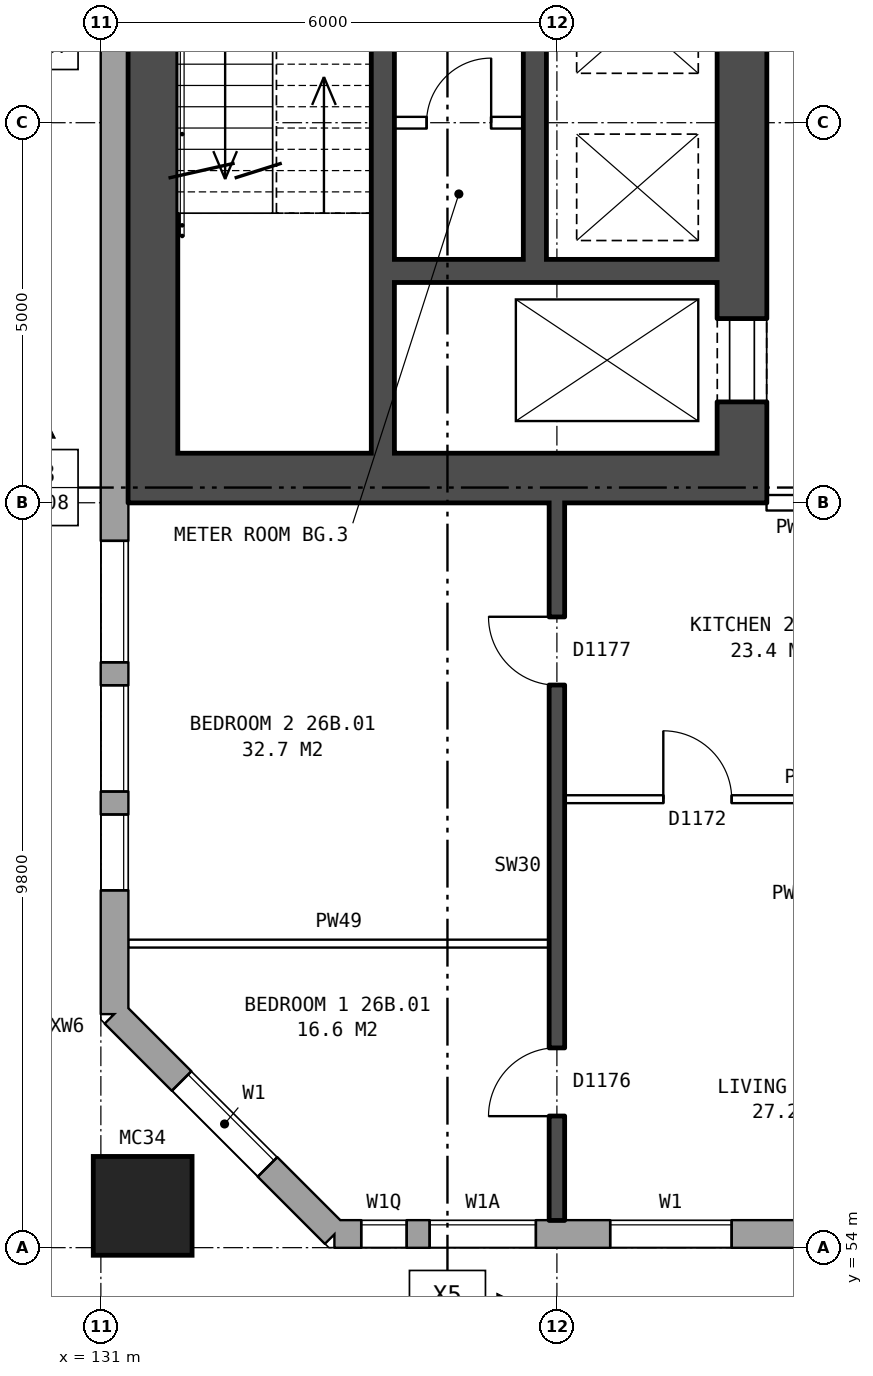
"""IFC4 building model, lengths in metres.
Left out: names, types, materials, properties, quantities, classifications, styles, units other than length and angle.
Written with IfcOpenShell. Run it as: python <this file> out.ifc"""

import sys

from ifc_helpers import new_model, si_unit, direction, frame, frame_2d, origin, origin_2d, place, context, subcontext, project, spatial, rectangle, hollow_rectangle, extrude, element, fill, save


model = new_model("IFC4")
c1 = context("Model", 3, precision=1e-05, world=origin(), true_north=direction((0.0, 1.0)))
c2 = subcontext(c1, "Body", "Model", "MODEL_VIEW")
j1 = project(units=[si_unit("LENGTHUNIT", "METRE"), si_unit("PLANEANGLEUNIT", "RADIAN")], contexts=[c1])
p1 = place(None, origin())
s1 = spatial("IfcSite", under=j1, at=p1, CompositionType="ELEMENT")
p2 = place(p1, origin())
s2 = spatial("IfcBuilding", under=s1, at=p2, CompositionType="ELEMENT")
p3 = place(p2, frame((0.0, 0.0, 96.4)))
s3 = spatial("IfcBuildingStorey", under=s2, at=p3, CompositionType="ELEMENT", Elevation=96.4)
p4 = place(p3, frame((131.55, 54.55, 0.0), z_axis=(0.0, 0.0, 1.0), x_axis=(1.0, 0.0, 0.0)))
e1 = element("IfcColumn", 1, at=p4, inside=s3, PredefinedType="COLUMN", context=c2, shape_type="SweptSolid", body=[
    extrude(hollow_rectangle(XDim=1.3, YDim=1.3, WallThickness=0.07, at=origin_2d()), origin(), (0.0, 0.0, 1.0), 3.1),
])
p5 = place(p3, frame((131.18, 57.075, 0.0), z_axis=(0.0, 0.0, 1.0), x_axis=(0.707106781187, -0.707106781187, 0.0)))
e2 = element("IfcWall", 2, at=p5, inside=s3, PredefinedType="STANDARD", context=c2, shape_type="SweptSolid", body=[
    extrude(rectangle(XDim=4.094, YDim=0.36, at=frame_2d((2.047, 0.0))), origin(), (0.0, 0.0, 1.0), 2.85),
])
p6 = place(p5, frame((1.247, 0.0, 0.8)))
e3 = element("IfcOpeningElement", 3, at=p6, cuts=e2, PredefinedType="OPENING", context=c2, shape_type="SweptSolid", body=[
    extrude(rectangle(XDim=1.6, YDim=1.8, at=frame_2d((0.8, 0.9))), frame((0.0, 0.19, 0.0), z_axis=(0.0, -1.0, 0.0), x_axis=(1.0, 0.0, 0.0)), (0.0, 0.0, 1.0), 0.38),
])
p7 = place(p3, frame((134.075, 54.18, 0.0), z_axis=(0.0, 0.0, 1.0), x_axis=(1.0, 0.0, 0.0)))
e4 = element("IfcWall", 4, at=p7, inside=s3, PredefinedType="STANDARD", context=c2, shape_type="SweptSolid", body=[
    extrude(rectangle(XDim=36.851, YDim=0.36, at=frame_2d((18.425, 0.0))), origin(), (0.0, 0.0, 1.0), 2.85),
])
p8 = place(p7, frame((0.35, 0.0, 0.8)))
e5 = element("IfcOpeningElement", 5, at=p8, cuts=e4, PredefinedType="OPENING", context=c2, shape_type="SweptSolid", body=[
    extrude(rectangle(XDim=0.6, YDim=1.2, at=frame_2d((0.3, 0.6))), frame((0.0, 0.19, 0.0), z_axis=(0.0, -1.0, 0.0), x_axis=(1.0, 0.0, 0.0)), (0.0, 0.0, 1.0), 0.38),
])
p9 = place(p7, frame((3.625, 0.0, 0.8)))
e6 = element("IfcOpeningElement", 6, at=p9, cuts=e4, PredefinedType="OPENING", context=c2, shape_type="SweptSolid", body=[
    extrude(rectangle(XDim=1.6, YDim=1.8, at=frame_2d((0.8, 0.9))), frame((0.0, 0.19, 0.0), z_axis=(0.0, -1.0, 0.0), x_axis=(1.0, 0.0, 0.0)), (0.0, 0.0, 1.0), 0.38),
])
p10 = place(p7, frame((6.625, 0.0, 0.8)))
e7 = element("IfcOpeningElement", 7, at=p10, cuts=e4, PredefinedType="OPENING", context=c2, shape_type="SweptSolid", body=[
    extrude(rectangle(XDim=1.6, YDim=1.8, at=frame_2d((0.8, 0.9))), frame((0.0, 0.19, 0.0), z_axis=(0.0, -1.0, 0.0), x_axis=(1.0, 0.0, 0.0)), (0.0, 0.0, 1.0), 0.38),
])
p11 = place(p7, frame((9.625, 0.0, 0.8)))
e8 = element("IfcOpeningElement", 8, at=p11, cuts=e4, PredefinedType="OPENING", context=c2, shape_type="SweptSolid", body=[
    extrude(rectangle(XDim=1.6, YDim=1.8, at=frame_2d((0.8, 0.9))), frame((0.0, 0.19, 0.0), z_axis=(0.0, -1.0, 0.0), x_axis=(1.0, 0.0, 0.0)), (0.0, 0.0, 1.0), 0.38),
])
p12 = place(p7, frame((12.625, 0.0, 0.8)))
e9 = element("IfcOpeningElement", 9, at=p12, cuts=e4, PredefinedType="OPENING", context=c2, shape_type="SweptSolid", body=[
    extrude(rectangle(XDim=1.6, YDim=1.8, at=frame_2d((0.8, 0.9))), frame((0.0, 0.19, 0.0), z_axis=(0.0, -1.0, 0.0), x_axis=(1.0, 0.0, 0.0)), (0.0, 0.0, 1.0), 0.38),
])
p13 = place(p7, frame((15.625, 0.0, 0.8)))
e10 = element("IfcOpeningElement", 10, at=p13, cuts=e4, PredefinedType="OPENING", context=c2, shape_type="SweptSolid", body=[
    extrude(rectangle(XDim=1.6, YDim=1.8, at=frame_2d((0.8, 0.9))), frame((0.0, 0.19, 0.0), z_axis=(0.0, -1.0, 0.0), x_axis=(1.0, 0.0, 0.0)), (0.0, 0.0, 1.0), 0.38),
])
p14 = place(p7, frame((18.625, 0.0, 0.8)))
e11 = element("IfcOpeningElement", 11, at=p14, cuts=e4, PredefinedType="OPENING", context=c2, shape_type="SweptSolid", body=[
    extrude(rectangle(XDim=1.6, YDim=1.8, at=frame_2d((0.8, 0.9))), frame((0.0, 0.19, 0.0), z_axis=(0.0, -1.0, 0.0), x_axis=(1.0, 0.0, 0.0)), (0.0, 0.0, 1.0), 0.38),
])
p15 = place(p7, frame((21.625, 0.0, 0.8)))
e12 = element("IfcOpeningElement", 12, at=p15, cuts=e4, PredefinedType="OPENING", context=c2, shape_type="SweptSolid", body=[
    extrude(rectangle(XDim=1.6, YDim=1.8, at=frame_2d((0.8, 0.9))), frame((0.0, 0.19, 0.0), z_axis=(0.0, -1.0, 0.0), x_axis=(1.0, 0.0, 0.0)), (0.0, 0.0, 1.0), 0.38),
])
p16 = place(p7, frame((24.625, 0.0, 0.8)))
e13 = element("IfcOpeningElement", 13, at=p16, cuts=e4, PredefinedType="OPENING", context=c2, shape_type="SweptSolid", body=[
    extrude(rectangle(XDim=1.6, YDim=1.8, at=frame_2d((0.8, 0.9))), frame((0.0, 0.19, 0.0), z_axis=(0.0, -1.0, 0.0), x_axis=(1.0, 0.0, 0.0)), (0.0, 0.0, 1.0), 0.38),
])
p17 = place(p7, frame((27.625, 0.0, 0.8)))
e14 = element("IfcOpeningElement", 14, at=p17, cuts=e4, PredefinedType="OPENING", context=c2, shape_type="SweptSolid", body=[
    extrude(rectangle(XDim=1.6, YDim=1.8, at=frame_2d((0.8, 0.9))), frame((0.0, 0.19, 0.0), z_axis=(0.0, -1.0, 0.0), x_axis=(1.0, 0.0, 0.0)), (0.0, 0.0, 1.0), 0.38),
])
p18 = place(p7, frame((30.625, 0.0, 0.8)))
e15 = element("IfcOpeningElement", 15, at=p18, cuts=e4, PredefinedType="OPENING", context=c2, shape_type="SweptSolid", body=[
    extrude(rectangle(XDim=1.6, YDim=1.8, at=frame_2d((0.8, 0.9))), frame((0.0, 0.19, 0.0), z_axis=(0.0, -1.0, 0.0), x_axis=(1.0, 0.0, 0.0)), (0.0, 0.0, 1.0), 0.38),
])
p19 = place(p7, frame((33.625, 0.0, 0.8)))
e16 = element("IfcOpeningElement", 16, at=p19, cuts=e4, PredefinedType="OPENING", context=c2, shape_type="SweptSolid", body=[
    extrude(rectangle(XDim=1.6, YDim=1.8, at=frame_2d((0.8, 0.9))), frame((0.0, 0.19, 0.0), z_axis=(0.0, -1.0, 0.0), x_axis=(1.0, 0.0, 0.0)), (0.0, 0.0, 1.0), 0.38),
])
p20 = place(p7, frame((1.25, 0.0, 0.8)))
e17 = element("IfcOpeningElement", 17, at=p20, cuts=e4, PredefinedType="OPENING", context=c2, shape_type="SweptSolid", body=[
    extrude(rectangle(XDim=1.4, YDim=1.8, at=frame_2d((0.7, 0.9))), frame((0.0, 0.19, 0.0), z_axis=(0.0, -1.0, 0.0), x_axis=(1.0, 0.0, 0.0)), (0.0, 0.0, 1.0), 0.38),
])
p21 = place(p3, frame((131.18, 82.925, 0.0), z_axis=(0.0, 0.0, 1.0), x_axis=(0.0, -1.0, 0.0)))
e18 = element("IfcWall", 18, at=p21, inside=s3, PredefinedType="STANDARD", context=c2, shape_type="SweptSolid", body=[
    extrude(rectangle(XDim=25.851, YDim=0.36, at=frame_2d((12.925, 0.0))), origin(), (0.0, 0.0, 1.0), 2.85),
])
p22 = place(p21, frame((1.425, 0.0, 0.8)))
e19 = element("IfcOpeningElement", 19, at=p22, cuts=e18, PredefinedType="OPENING", context=c2, shape_type="SweptSolid", body=[
    extrude(rectangle(XDim=1.0, YDim=1.2, at=frame_2d((0.5, 0.6))), frame((0.0, 0.19, 0.0), z_axis=(0.0, -1.0, 0.0), x_axis=(1.0, 0.0, 0.0)), (0.0, 0.0, 1.0), 0.38),
])
p23 = place(p21, frame((4.625, 0.0, 0.8)))
e20 = element("IfcOpeningElement", 20, at=p23, cuts=e18, PredefinedType="OPENING", context=c2, shape_type="SweptSolid", body=[
    extrude(rectangle(XDim=1.6, YDim=1.8, at=frame_2d((0.8, 0.9))), frame((0.0, 0.19, 0.0), z_axis=(0.0, -1.0, 0.0), x_axis=(1.0, 0.0, 0.0)), (0.0, 0.0, 1.0), 0.38),
])
p24 = place(p21, frame((19.625, 0.0, 0.8)))
e21 = element("IfcOpeningElement", 21, at=p24, cuts=e18, PredefinedType="OPENING", context=c2, shape_type="SweptSolid", body=[
    extrude(rectangle(XDim=1.6, YDim=1.8, at=frame_2d((0.8, 0.9))), frame((0.0, 0.19, 0.0), z_axis=(0.0, -1.0, 0.0), x_axis=(1.0, 0.0, 0.0)), (0.0, 0.0, 1.0), 0.38),
])
p25 = place(p21, frame((21.525, 0.0, 0.8)))
e22 = element("IfcOpeningElement", 22, at=p25, cuts=e18, PredefinedType="OPENING", context=c2, shape_type="SweptSolid", body=[
    extrude(rectangle(XDim=1.4, YDim=1.8, at=frame_2d((0.7, 0.9))), frame((0.0, 0.19, 0.0), z_axis=(0.0, -1.0, 0.0), x_axis=(1.0, 0.0, 0.0)), (0.0, 0.0, 1.0), 0.38),
])
p26 = place(p21, frame((2.725, 0.0, 0.8)))
e23 = element("IfcOpeningElement", 23, at=p26, cuts=e18, PredefinedType="OPENING", context=c2, shape_type="SweptSolid", body=[
    extrude(rectangle(XDim=1.4, YDim=1.8, at=frame_2d((0.7, 0.9))), frame((0.0, 0.19, 0.0), z_axis=(0.0, -1.0, 0.0), x_axis=(1.0, 0.0, 0.0)), (0.0, 0.0, 1.0), 0.38),
])
p27 = place(p21, frame((23.225, 0.0, 0.8)))
e24 = element("IfcOpeningElement", 24, at=p27, cuts=e18, PredefinedType="OPENING", context=c2, shape_type="SweptSolid", body=[
    extrude(rectangle(XDim=1.0, YDim=1.2, at=frame_2d((0.5, 0.6))), frame((0.0, 0.19, 0.0), z_axis=(0.0, -1.0, 0.0), x_axis=(1.0, 0.0, 0.0)), (0.0, 0.0, 1.0), 0.38),
])
p28 = place(p3, frame((139.435, 64.45, 0.0), z_axis=(0.0, 0.0, 1.0), x_axis=(0.0, 1.0, 0.0)))
e25 = element("IfcWall", 25, at=p28, inside=s3, PredefinedType="SHEAR", context=c2, shape_type="SweptSolid", body=[
    extrude(rectangle(XDim=11.1, YDim=0.65, at=frame_2d((5.55, 0.0))), origin(), (0.0, 0.0, 1.0), 2.85),
])
p29 = place(p28, frame((0.675, 0.0, 0.0)))
e26 = element("IfcOpeningElement", 26, at=p29, cuts=e25, PredefinedType="OPENING", context=c2, shape_type="SweptSolid", body=[
    extrude(rectangle(XDim=1.1, YDim=2.1, at=frame_2d((0.55, 1.05))), frame((0.0, 0.335, 0.0), z_axis=(0.0, -1.0, 0.0), x_axis=(1.0, 0.0, 0.0)), (0.0, 0.0, 1.0), 0.67),
])
p30 = place(p28, frame((9.25, 0.0, 0.0)))
e27 = element("IfcOpeningElement", 27, at=p30, cuts=e25, PredefinedType="OPENING", context=c2, shape_type="SweptSolid", body=[
    extrude(rectangle(XDim=1.1, YDim=2.1, at=frame_2d((0.55, 1.05))), frame((0.0, 0.335, 0.0), z_axis=(0.0, -1.0, 0.0), x_axis=(1.0, 0.0, 0.0)), (0.0, 0.0, 1.0), 0.67),
])
p31 = place(p28, frame((7.475, 0.0, 0.0)))
e28 = element("IfcOpeningElement", 28, at=p31, cuts=e25, PredefinedType="OPENING", context=c2, shape_type="SweptSolid", body=[
    extrude(rectangle(XDim=0.85, YDim=2.1, at=frame_2d((0.425, 1.05))), frame((0.0, 0.335, 0.0), z_axis=(0.0, -1.0, 0.0), x_axis=(1.0, 0.0, 0.0)), (0.0, 0.0, 1.0), 0.67),
])
p32 = place(p3, frame((131.685, 64.45, 0.0), z_axis=(0.0, 0.0, 1.0), x_axis=(0.0, 1.0, 0.0)))
e29 = element("IfcWall", 29, at=p32, inside=s3, PredefinedType="SHEAR", context=c2, shape_type="SweptSolid", body=[
    extrude(rectangle(XDim=11.1, YDim=0.65, at=frame_2d((5.55, 0.0))), origin(), (0.0, 0.0, 1.0), 2.85),
])
p33 = place(p3, frame((139.76, 64.125, 0.0), z_axis=(0.0, 0.0, 1.0), x_axis=(-1.0, 0.0, 0.0)))
e30 = element("IfcWall", 30, at=p33, inside=s3, PredefinedType="SHEAR", context=c2, shape_type="SweptSolid", body=[
    extrude(rectangle(XDim=8.4, YDim=0.65, at=frame_2d((4.2, 0.0))), origin(), (0.0, 0.0, 1.0), 2.85),
])
p34 = place(p3, frame((139.11, 66.85, 0.0), z_axis=(0.0, 0.0, 1.0), x_axis=(-1.0, 0.0, 0.0)))
e31 = element("IfcWall", 31, at=p34, inside=s3, PredefinedType="SHEAR", context=c2, shape_type="SweptSolid", body=[
    extrude(rectangle(XDim=4.25, YDim=0.3, at=frame_2d((2.125, 0.0))), origin(), (0.0, 0.0, 1.0), 2.85),
])
p35 = place(p3, frame((136.56, 68.8, 0.0), z_axis=(0.0, 0.0, 1.0), x_axis=(-1.0, 0.0, 0.0)))
e32 = element("IfcWall", 32, at=p35, inside=s3, PredefinedType="PARTITIONING", context=c2, shape_type="SweptSolid", body=[
    extrude(rectangle(XDim=1.7, YDim=0.15, at=frame_2d((0.85, 0.0))), origin(), (0.0, 0.0, 1.0), 2.85),
])
p36 = place(p35, frame((0.425, 0.0, 0.0)))
e33 = element("IfcOpeningElement", 33, at=p36, cuts=e32, PredefinedType="OPENING", context=c2, shape_type="SweptSolid", body=[
    extrude(rectangle(XDim=0.85, YDim=2.1, at=frame_2d((0.425, 1.05))), frame((0.0, 0.085, 0.0), z_axis=(0.0, -1.0, 0.0), x_axis=(1.0, 0.0, 0.0)), (0.0, 0.0, 1.0), 0.17),
])
p37 = place(p3, frame((136.71, 67.0, 0.0), z_axis=(0.0, 0.0, 1.0), x_axis=(0.0, 1.0, 0.0)))
e34 = element("IfcWall", 34, at=p37, inside=s3, PredefinedType="SHEAR", context=c2, shape_type="SweptSolid", body=[
    extrude(rectangle(XDim=4.1, YDim=0.3, at=frame_2d((2.05, 0.0))), origin(), (0.0, 0.0, 1.0), 2.85),
])
p38 = place(p3, frame((134.71, 64.45, 0.0), z_axis=(0.0, 0.0, 1.0), x_axis=(0.0, 1.0, 0.0)))
e35 = element("IfcWall", 35, at=p38, inside=s3, PredefinedType="SHEAR", context=c2, shape_type="SweptSolid", body=[
    extrude(rectangle(XDim=6.65, YDim=0.3, at=frame_2d((3.325, 0.0))), origin(), (0.0, 0.0, 1.0), 2.85),
])
p39 = place(p3, frame((131.36, 58.0, 0.0), z_axis=(0.0, 0.0, 1.0), x_axis=(1.0, 0.0, 0.0)))
e36 = element("IfcWall", 36, at=p39, inside=s3, PredefinedType="PARTITIONING", context=c2, shape_type="SweptSolid", body=[
    extrude(rectangle(XDim=5.54, YDim=0.1, at=frame_2d((2.77, 0.0))), origin(), (0.0, 0.0, 1.0), 2.85),
])
p40 = place(p3, frame((137.1, 59.9, 0.0), z_axis=(0.0, 0.0, 1.0), x_axis=(1.0, 0.0, 0.0)))
e37 = element("IfcWall", 37, at=p40, inside=s3, PredefinedType="PARTITIONING", context=c2, shape_type="SweptSolid", body=[
    extrude(rectangle(XDim=5.8, YDim=0.1, at=frame_2d((2.9, 0.0))), origin(), (0.0, 0.0, 1.0), 2.85),
])
p41 = place(p40, frame((1.3, 0.0, 0.0)))
e38 = element("IfcOpeningElement", 38, at=p41, cuts=e37, PredefinedType="OPENING", context=c2, shape_type="SweptSolid", body=[
    extrude(rectangle(XDim=0.9, YDim=2.1, at=frame_2d((0.45, 1.05))), frame((0.0, 0.06, 0.0), z_axis=(0.0, -1.0, 0.0), x_axis=(1.0, 0.0, 0.0)), (0.0, 0.0, 1.0), 0.12),
])
p42 = place(p40, frame((4.2, 0.0, 0.0)))
e39 = element("IfcOpeningElement", 39, at=p42, cuts=e37, PredefinedType="OPENING", context=c2, shape_type="SweptSolid", body=[
    extrude(rectangle(XDim=0.9, YDim=2.1, at=frame_2d((0.45, 1.05))), frame((0.0, 0.06, 0.0), z_axis=(0.0, -1.0, 0.0), x_axis=(1.0, 0.0, 0.0)), (0.0, 0.0, 1.0), 0.12),
])
p43 = place(p3, frame((139.76, 63.8, 0.0), z_axis=(0.0, 0.0, 1.0), x_axis=(1.0, 0.0, 0.0)))
e40 = element("IfcWall", 40, at=p43, inside=s3, PredefinedType="PARTITIONING", context=c2, shape_type="SweptSolid", body=[
    extrude(rectangle(XDim=3.0, YDim=0.2, at=frame_2d((1.5, 0.0))), origin(), (0.0, 0.0, 1.0), 2.85),
])
p44 = place(p43, frame((1.0, 0.0, 0.0)))
e41 = element("IfcOpeningElement", 41, at=p44, cuts=e40, PredefinedType="OPENING", context=c2, shape_type="SweptSolid", body=[
    extrude(rectangle(XDim=1.0, YDim=2.1, at=frame_2d((0.5, 1.05))), frame((0.0, 0.11, 0.0), z_axis=(0.0, -1.0, 0.0), x_axis=(1.0, 0.0, 0.0)), (0.0, 0.0, 1.0), 0.22),
])
p45 = place(p3, frame((137.0, 54.36, 0.0), z_axis=(0.0, 0.0, 1.0), x_axis=(0.0, 1.0, 0.0)))
e42 = element("IfcWall", 42, at=p45, inside=s3, PredefinedType="SOLIDWALL", context=c2, shape_type="SweptSolid", body=[
    extrude(rectangle(XDim=9.44, YDim=0.2, at=frame_2d((4.72, 0.0))), origin(), (0.0, 0.0, 1.0), 2.85),
])
p46 = place(p45, frame((1.37, 0.0, 0.0)))
e43 = element("IfcOpeningElement", 43, at=p46, cuts=e42, PredefinedType="OPENING", context=c2, shape_type="SweptSolid", body=[
    extrude(rectangle(XDim=0.9, YDim=2.1, at=frame_2d((0.45, 1.05))), frame((0.0, 0.11, 0.0), z_axis=(0.0, -1.0, 0.0), x_axis=(1.0, 0.0, 0.0)), (0.0, 0.0, 1.0), 0.22),
])
p47 = place(p45, frame((7.04, 0.0, 0.0)))
e44 = element("IfcOpeningElement", 44, at=p47, cuts=e42, PredefinedType="OPENING", context=c2, shape_type="SweptSolid", body=[
    extrude(rectangle(XDim=0.9, YDim=2.1, at=frame_2d((0.45, 1.05))), frame((0.0, 0.11, 0.0), z_axis=(0.0, -1.0, 0.0), x_axis=(1.0, 0.0, 0.0)), (0.0, 0.0, 1.0), 0.22),
])
p48 = place(p6, origin())
e45 = element("IfcWindow", 45, at=p48, inside=s3, PartitioningType="SINGLE_PANEL", PredefinedType="WINDOW", context=c2, shape_type="SweptSolid", body=[
    extrude(rectangle(XDim=1.6, YDim=1.8, at=frame_2d((0.8, 0.9))), frame((0.0, 0.15, 0.0), z_axis=(0.0, -1.0, 0.0), x_axis=(1.0, 0.0, 0.0)), (0.0, 0.0, 1.0), 0.06),
])
fill(e3, e45)
p49 = place(p8, origin())
e46 = element("IfcWindow", 46, at=p49, inside=s3, PartitioningType="SINGLE_PANEL", PredefinedType="WINDOW", context=c2, shape_type="SweptSolid", body=[
    extrude(rectangle(XDim=0.6, YDim=1.2, at=frame_2d((0.3, 0.6))), frame((0.0, 0.15, 0.0), z_axis=(0.0, -1.0, 0.0), x_axis=(1.0, 0.0, 0.0)), (0.0, 0.0, 1.0), 0.06),
])
fill(e5, e46)
p50 = place(p9, origin())
e47 = element("IfcWindow", 47, at=p50, inside=s3, PartitioningType="SINGLE_PANEL", PredefinedType="WINDOW", context=c2, shape_type="SweptSolid", body=[
    extrude(rectangle(XDim=1.6, YDim=1.8, at=frame_2d((0.8, 0.9))), frame((0.0, 0.15, 0.0), z_axis=(0.0, -1.0, 0.0), x_axis=(1.0, 0.0, 0.0)), (0.0, 0.0, 1.0), 0.06),
])
fill(e6, e47)
p51 = place(p24, origin())
e48 = element("IfcWindow", 48, at=p51, inside=s3, PartitioningType="SINGLE_PANEL", PredefinedType="WINDOW", context=c2, shape_type="SweptSolid", body=[
    extrude(rectangle(XDim=1.6, YDim=1.8, at=frame_2d((0.8, 0.9))), frame((0.0, 0.15, 0.0), z_axis=(0.0, -1.0, 0.0), x_axis=(1.0, 0.0, 0.0)), (0.0, 0.0, 1.0), 0.06),
])
fill(e21, e48)
p52 = place(p25, origin())
e49 = element("IfcWindow", 49, at=p52, inside=s3, PartitioningType="SINGLE_PANEL", PredefinedType="WINDOW", context=c2, shape_type="SweptSolid", body=[
    extrude(rectangle(XDim=1.4, YDim=1.8, at=frame_2d((0.7, 0.9))), frame((0.0, 0.15, 0.0), z_axis=(0.0, -1.0, 0.0), x_axis=(1.0, 0.0, 0.0)), (0.0, 0.0, 1.0), 0.06),
])
fill(e22, e49)
p53 = place(p29, origin())
e50 = element("IfcDoor", 50, at=p53, inside=s3, OperationType="DOUBLE_DOOR_SLIDING", PredefinedType="DOOR", context=c2, shape_type="SweptSolid", body=[
    extrude(rectangle(XDim=1.1, YDim=2.1, at=frame_2d((0.55, 1.05))), frame((0.0, 0.31, 0.0), z_axis=(0.0, -1.0, 0.0), x_axis=(1.0, 0.0, 0.0)), (0.0, 0.0, 1.0), 0.05),
])
fill(e26, e50)
p54 = place(p36, frame((0.85, 0.0, 0.0), z_axis=(0.0, 0.0, 1.0), x_axis=(-1.0, 0.0, 0.0)))
e51 = element("IfcDoor", 51, at=p54, inside=s3, OperationType="SINGLE_SWING_RIGHT", PredefinedType="DOOR", context=c2, shape_type="SweptSolid", body=[
    extrude(rectangle(XDim=0.85, YDim=2.1, at=frame_2d((0.425, 1.05))), frame((0.0, 0.025, 0.0), z_axis=(0.0, -1.0, 0.0), x_axis=(1.0, 0.0, 0.0)), (0.0, 0.0, 1.0), 0.05),
])
fill(e33, e51)
p55 = place(p46, origin())
e52 = element("IfcDoor", 52, at=p55, inside=s3, OperationType="SINGLE_SWING_LEFT", PredefinedType="DOOR", context=c2, shape_type="SweptSolid", body=[
    extrude(rectangle(XDim=0.9, YDim=2.1, at=frame_2d((0.45, 1.05))), frame((0.0, 0.025, 0.0), z_axis=(0.0, -1.0, 0.0), x_axis=(1.0, 0.0, 0.0)), (0.0, 0.0, 1.0), 0.05),
])
fill(e43, e52)
p56 = place(p47, origin())
e53 = element("IfcDoor", 53, at=p56, inside=s3, OperationType="SINGLE_SWING_RIGHT", PredefinedType="DOOR", context=c2, shape_type="SweptSolid", body=[
    extrude(rectangle(XDim=0.9, YDim=2.1, at=frame_2d((0.45, 1.05))), frame((0.0, 0.025, 0.0), z_axis=(0.0, -1.0, 0.0), x_axis=(1.0, 0.0, 0.0)), (0.0, 0.0, 1.0), 0.05),
])
fill(e44, e53)
p57 = place(p41, origin())
e54 = element("IfcDoor", 54, at=p57, inside=s3, OperationType="SINGLE_SWING_LEFT", PredefinedType="DOOR", context=c2, shape_type="SweptSolid", body=[
    extrude(rectangle(XDim=0.9, YDim=2.1, at=frame_2d((0.45, 1.05))), frame((0.0, 0.025, 0.0), z_axis=(0.0, -1.0, 0.0), x_axis=(1.0, 0.0, 0.0)), (0.0, 0.0, 1.0), 0.05),
])
fill(e38, e54)
p58 = place(p20, origin())
e55 = element("IfcWindow", 55, at=p58, inside=s3, PartitioningType="SINGLE_PANEL", PredefinedType="WINDOW", context=c2, shape_type="SweptSolid", body=[
    extrude(rectangle(XDim=1.4, YDim=1.8, at=frame_2d((0.7, 0.9))), frame((0.0, 0.15, 0.0), z_axis=(0.0, -1.0, 0.0), x_axis=(1.0, 0.0, 0.0)), (0.0, 0.0, 1.0), 0.06),
])
fill(e17, e55)
p59 = place(p27, origin())
e56 = element("IfcWindow", 56, at=p59, inside=s3, PartitioningType="SINGLE_PANEL", PredefinedType="WINDOW", context=c2, shape_type="SweptSolid", body=[
    extrude(rectangle(XDim=1.0, YDim=1.2, at=frame_2d((0.5, 0.6))), frame((0.0, 0.15, 0.0), z_axis=(0.0, -1.0, 0.0), x_axis=(1.0, 0.0, 0.0)), (0.0, 0.0, 1.0), 0.06),
])
fill(e24, e56)
save(model, sys.argv[1])
